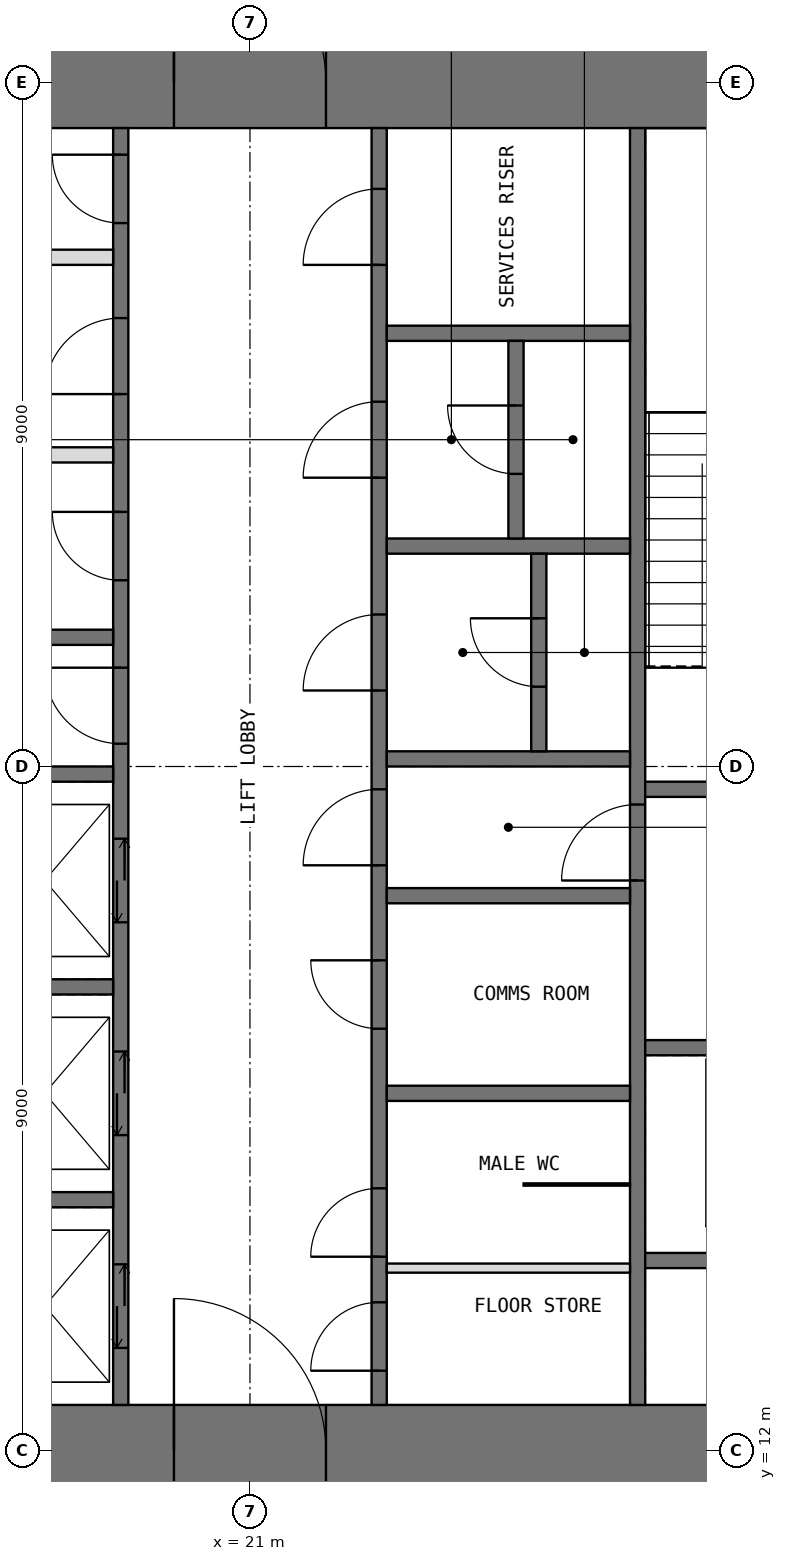
"""IFC4 building model, lengths in metres.
Left out: names, types, materials, properties, quantities, classifications, styles, units other than length and angle.
Written with IfcOpenShell. Run it as: python <this file> out.ifc"""

import sys

from ifc_helpers import new_model, si_unit, direction, frame, frame_2d, origin, place, context, subcontext, project, spatial, rectangle, extrude, element, fill, save


model = new_model("IFC4")
c1 = context("Model", 3, precision=1e-05, world=origin(), true_north=direction((0.0, 1.0)))
c2 = subcontext(c1, "Body", "Model", "MODEL_VIEW")
j1 = project(units=[si_unit("LENGTHUNIT", "METRE"), si_unit("PLANEANGLEUNIT", "RADIAN")], contexts=[c1])
p1 = place(None, origin())
s1 = spatial("IfcSite", under=j1, at=p1, CompositionType="ELEMENT")
p2 = place(p1, origin())
s2 = spatial("IfcBuilding", under=s1, at=p2, CompositionType="ELEMENT")
p3 = place(p2, frame((0.0, 0.0, 260.8)))
s3 = spatial("IfcBuildingStorey", under=s2, at=p3, CompositionType="ELEMENT", Elevation=260.8)
p4 = place(p3, frame((11.4, 12.0, -0.05), z_axis=(0.0, 0.0, 1.0), x_axis=(1.0, 0.0, 0.0)))
e1 = element("IfcWall", 1, at=p4, inside=s3, PredefinedType="SHEAR", context=c2, shape_type="SweptSolid", body=[
    extrude(rectangle(XDim=19.2, YDim=1.2, at=frame_2d((9.6, 0.0))), origin(), (0.0, 0.0, 1.0), 4.2),
])
p5 = place(p4, frame((8.6, 0.0, 0.05)))
e2 = element("IfcOpeningElement", 2, at=p5, cuts=e1, PredefinedType="OPENING", context=c2, shape_type="SweptSolid", body=[
    extrude(rectangle(XDim=2.0, YDim=2.2, at=frame_2d((1.0, 1.1))), frame((0.0, 0.61, 0.0), z_axis=(0.0, -1.0, 0.0), x_axis=(1.0, 0.0, 0.0)), (0.0, 0.0, 1.0), 1.22),
])
p6 = place(p3, frame((11.4, 30.0, -0.05), z_axis=(0.0, 0.0, 1.0), x_axis=(1.0, 0.0, 0.0)))
e3 = element("IfcWall", 3, at=p6, inside=s3, PredefinedType="SHEAR", context=c2, shape_type="SweptSolid", body=[
    extrude(rectangle(XDim=19.2, YDim=1.2, at=frame_2d((9.6, 0.0))), origin(), (0.0, 0.0, 1.0), 4.2),
])
p7 = place(p6, frame((8.6, 0.0, 0.05)))
e4 = element("IfcOpeningElement", 4, at=p7, cuts=e3, PredefinedType="OPENING", context=c2, shape_type="SweptSolid", body=[
    extrude(rectangle(XDim=2.0, YDim=2.2, at=frame_2d((1.0, 1.1))), frame((0.0, 0.61, 0.0), z_axis=(0.0, -1.0, 0.0), x_axis=(1.0, 0.0, 0.0)), (0.0, 0.0, 1.0), 1.22),
])
p8 = place(p3, frame((19.3, 12.6, -0.05), z_axis=(0.0, 0.0, 1.0), x_axis=(0.0, 1.0, 0.0)))
e5 = element("IfcWall", 5, at=p8, inside=s3, PredefinedType="SHEAR", context=c2, shape_type="SweptSolid", body=[
    extrude(rectangle(XDim=16.8, YDim=0.2, at=frame_2d((8.4, 0.0))), origin(), (0.0, 0.0, 1.0), 4.2),
])
p9 = place(p8, frame((8.7, 0.0, 0.05)))
e6 = element("IfcOpeningElement", 6, at=p9, cuts=e5, PredefinedType="OPENING", context=c2, shape_type="SweptSolid", body=[
    extrude(rectangle(XDim=1.0, YDim=2.2, at=frame_2d((0.5, 1.1))), frame((0.0, 0.11, 0.0), z_axis=(0.0, -1.0, 0.0), x_axis=(1.0, 0.0, 0.0)), (0.0, 0.0, 1.0), 0.22),
])
p10 = place(p8, frame((10.85, 0.0, 0.05)))
e7 = element("IfcOpeningElement", 7, at=p10, cuts=e5, PredefinedType="OPENING", context=c2, shape_type="SweptSolid", body=[
    extrude(rectangle(XDim=0.9, YDim=2.2, at=frame_2d((0.45, 1.1))), frame((0.0, 0.11, 0.0), z_axis=(0.0, -1.0, 0.0), x_axis=(1.0, 0.0, 0.0)), (0.0, 0.0, 1.0), 0.22),
])
p11 = place(p8, frame((13.3, 0.0, 0.05)))
e8 = element("IfcOpeningElement", 8, at=p11, cuts=e5, PredefinedType="OPENING", context=c2, shape_type="SweptSolid", body=[
    extrude(rectangle(XDim=1.0, YDim=2.2, at=frame_2d((0.5, 1.1))), frame((0.0, 0.11, 0.0), z_axis=(0.0, -1.0, 0.0), x_axis=(1.0, 0.0, 0.0)), (0.0, 0.0, 1.0), 0.22),
])
p12 = place(p8, frame((15.55, 0.0, 0.05)))
e9 = element("IfcOpeningElement", 9, at=p12, cuts=e5, PredefinedType="OPENING", context=c2, shape_type="SweptSolid", body=[
    extrude(rectangle(XDim=0.9, YDim=2.2, at=frame_2d((0.45, 1.1))), frame((0.0, 0.11, 0.0), z_axis=(0.0, -1.0, 0.0), x_axis=(1.0, 0.0, 0.0)), (0.0, 0.0, 1.0), 0.22),
])
p13 = place(p8, frame((0.75, 0.0, 0.05)))
e10 = element("IfcOpeningElement", 10, at=p13, cuts=e5, PredefinedType="OPENING", context=c2, shape_type="SweptSolid", body=[
    extrude(rectangle(XDim=1.1, YDim=2.2, at=frame_2d((0.55, 1.1))), frame((0.0, 0.11, 0.0), z_axis=(0.0, -1.0, 0.0), x_axis=(1.0, 0.0, 0.0)), (0.0, 0.0, 1.0), 0.22),
])
p14 = place(p8, frame((3.55, 0.0, 0.05)))
e11 = element("IfcOpeningElement", 11, at=p14, cuts=e5, PredefinedType="OPENING", context=c2, shape_type="SweptSolid", body=[
    extrude(rectangle(XDim=1.1, YDim=2.2, at=frame_2d((0.55, 1.1))), frame((0.0, 0.11, 0.0), z_axis=(0.0, -1.0, 0.0), x_axis=(1.0, 0.0, 0.0)), (0.0, 0.0, 1.0), 0.22),
])
p15 = place(p8, frame((6.35, 0.0, 0.05)))
e12 = element("IfcOpeningElement", 12, at=p15, cuts=e5, PredefinedType="OPENING", context=c2, shape_type="SweptSolid", body=[
    extrude(rectangle(XDim=1.1, YDim=2.2, at=frame_2d((0.55, 1.1))), frame((0.0, 0.11, 0.0), z_axis=(0.0, -1.0, 0.0), x_axis=(1.0, 0.0, 0.0)), (0.0, 0.0, 1.0), 0.22),
])
p16 = place(p3, frame((22.7, 12.6, -0.05), z_axis=(0.0, 0.0, 1.0), x_axis=(0.0, 1.0, 0.0)))
e13 = element("IfcWall", 13, at=p16, inside=s3, PredefinedType="SHEAR", context=c2, shape_type="SweptSolid", body=[
    extrude(rectangle(XDim=16.8, YDim=0.2, at=frame_2d((8.4, 0.0))), origin(), (0.0, 0.0, 1.0), 4.2),
])
p17 = place(p16, frame((0.45, 0.0, 0.05)))
e14 = element("IfcOpeningElement", 14, at=p17, cuts=e13, PredefinedType="OPENING", context=c2, shape_type="SweptSolid", body=[
    extrude(rectangle(XDim=0.9, YDim=2.2, at=frame_2d((0.45, 1.1))), frame((0.0, 0.11, 0.0), z_axis=(0.0, -1.0, 0.0), x_axis=(1.0, 0.0, 0.0)), (0.0, 0.0, 1.0), 0.22),
])
p18 = place(p16, frame((7.1, 0.0, 0.05)))
e15 = element("IfcOpeningElement", 15, at=p18, cuts=e13, PredefinedType="OPENING", context=c2, shape_type="SweptSolid", body=[
    extrude(rectangle(XDim=1.0, YDim=2.2, at=frame_2d((0.5, 1.1))), frame((0.0, 0.11, 0.0), z_axis=(0.0, -1.0, 0.0), x_axis=(1.0, 0.0, 0.0)), (0.0, 0.0, 1.0), 0.22),
])
p19 = place(p16, frame((1.95, 0.0, 0.05)))
e16 = element("IfcOpeningElement", 16, at=p19, cuts=e13, PredefinedType="OPENING", context=c2, shape_type="SweptSolid", body=[
    extrude(rectangle(XDim=0.9, YDim=2.2, at=frame_2d((0.45, 1.1))), frame((0.0, 0.11, 0.0), z_axis=(0.0, -1.0, 0.0), x_axis=(1.0, 0.0, 0.0)), (0.0, 0.0, 1.0), 0.22),
])
p20 = place(p16, frame((4.95, 0.0, 0.05)))
e17 = element("IfcOpeningElement", 17, at=p20, cuts=e13, PredefinedType="OPENING", context=c2, shape_type="SweptSolid", body=[
    extrude(rectangle(XDim=0.9, YDim=2.2, at=frame_2d((0.45, 1.1))), frame((0.0, 0.11, 0.0), z_axis=(0.0, -1.0, 0.0), x_axis=(1.0, 0.0, 0.0)), (0.0, 0.0, 1.0), 0.22),
])
p21 = place(p16, frame((9.4, 0.0, 0.05)))
e18 = element("IfcOpeningElement", 18, at=p21, cuts=e13, PredefinedType="OPENING", context=c2, shape_type="SweptSolid", body=[
    extrude(rectangle(XDim=1.0, YDim=2.2, at=frame_2d((0.5, 1.1))), frame((0.0, 0.11, 0.0), z_axis=(0.0, -1.0, 0.0), x_axis=(1.0, 0.0, 0.0)), (0.0, 0.0, 1.0), 0.22),
])
p22 = place(p16, frame((12.2, 0.0, 0.05)))
e19 = element("IfcOpeningElement", 19, at=p22, cuts=e13, PredefinedType="OPENING", context=c2, shape_type="SweptSolid", body=[
    extrude(rectangle(XDim=1.0, YDim=2.2, at=frame_2d((0.5, 1.1))), frame((0.0, 0.11, 0.0), z_axis=(0.0, -1.0, 0.0), x_axis=(1.0, 0.0, 0.0)), (0.0, 0.0, 1.0), 0.22),
])
p23 = place(p16, frame((15.0, 0.0, 0.05)))
e20 = element("IfcOpeningElement", 20, at=p23, cuts=e13, PredefinedType="OPENING", context=c2, shape_type="SweptSolid", body=[
    extrude(rectangle(XDim=1.0, YDim=2.2, at=frame_2d((0.5, 1.1))), frame((0.0, 0.11, 0.0), z_axis=(0.0, -1.0, 0.0), x_axis=(1.0, 0.0, 0.0)), (0.0, 0.0, 1.0), 0.22),
])
p24 = place(p3, frame((26.1, 12.6, -0.05), z_axis=(0.0, 0.0, 1.0), x_axis=(0.0, 1.0, 0.0)))
e21 = element("IfcWall", 21, at=p24, inside=s3, PredefinedType="SHEAR", context=c2, shape_type="SweptSolid", body=[
    extrude(rectangle(XDim=16.8, YDim=0.2, at=frame_2d((8.4, 0.0))), origin(), (0.0, 0.0, 1.0), 4.2),
])
p25 = place(p24, frame((6.9, 0.0, 0.05)))
e22 = element("IfcOpeningElement", 22, at=p25, cuts=e21, PredefinedType="OPENING", context=c2, shape_type="SweptSolid", body=[
    extrude(rectangle(XDim=1.0, YDim=2.2, at=frame_2d((0.5, 1.1))), frame((0.0, 0.11, 0.0), z_axis=(0.0, -1.0, 0.0), x_axis=(1.0, 0.0, 0.0)), (0.0, 0.0, 1.0), 0.22),
])
for number, where, z_axis, x_axis in (
    (23, (16.0, 15.3, -0.05), (0.0, 0.0, 1.0), (1.0, 0.0, 0.0)),
    (24, (16.0, 18.1, -0.05), (0.0, 0.0, 1.0), (1.0, 0.0, 0.0)),
    (25, (16.0, 20.9, -0.05), (0.0, 0.0, 1.0), (1.0, 0.0, 0.0)),
    (26, (16.0, 22.7, -0.05), (0.0, 0.0, 1.0), (1.0, 0.0, 0.0)),
):
    element("IfcWall", number, at=place(p3, frame(where, z_axis=z_axis, x_axis=x_axis)), inside=s3, PredefinedType="SHEAR", context=c2, shape_type="SweptSolid", body=[
        extrude(rectangle(XDim=3.2, YDim=0.2, at=frame_2d((1.6, 0.0))), origin(), (0.0, 0.0, 1.0), 4.2),
    ])
for number, where, z_axis, x_axis in (
    (27, (16.0, 25.1, 0.0), (0.0, 0.0, 1.0), (1.0, 0.0, 0.0)),
    (28, (16.0, 27.7, 0.0), (0.0, 0.0, 1.0), (1.0, 0.0, 0.0)),
):
    element("IfcWall", number, at=place(p3, frame(where, z_axis=z_axis, x_axis=x_axis)), inside=s3, PredefinedType="PARTITIONING", context=c2, shape_type="SweptSolid", body=[
        extrude(rectangle(XDim=3.2, YDim=0.2, at=frame_2d((1.6, 0.0))), origin(), (0.0, 0.0, 1.0), 3.95),
    ])
for number, where, z_axis, x_axis in (
    (29, (22.8, 16.7, -0.05), (0.0, 0.0, 1.0), (1.0, 0.0, 0.0)),
    (30, (22.8, 19.3, -0.05), (0.0, 0.0, 1.0), (1.0, 0.0, 0.0)),
    (31, (22.8, 21.1, -0.05), (0.0, 0.0, 1.0), (1.0, 0.0, 0.0)),
    (32, (22.8, 23.9, -0.05), (0.0, 0.0, 1.0), (1.0, 0.0, 0.0)),
    (33, (22.8, 26.7, -0.05), (0.0, 0.0, 1.0), (1.0, 0.0, 0.0)),
    (34, (26.2, 14.5, -0.05), (0.0, 0.0, 1.0), (1.0, 0.0, 0.0)),
):
    element("IfcWall", number, at=place(p3, frame(where, z_axis=z_axis, x_axis=x_axis)), inside=s3, PredefinedType="SHEAR", context=c2, shape_type="SweptSolid", body=[
        extrude(rectangle(XDim=3.2, YDim=0.2, at=frame_2d((1.6, 0.0))), origin(), (0.0, 0.0, 1.0), 4.2),
    ])
p26 = place(p3, frame((26.2, 17.3, -0.05), z_axis=(0.0, 0.0, 1.0), x_axis=(1.0, 0.0, 0.0)))
e35 = element("IfcWall", 35, at=p26, inside=s3, PredefinedType="SHEAR", context=c2, shape_type="SweptSolid", body=[
    extrude(rectangle(XDim=3.2, YDim=0.2, at=frame_2d((1.6, 0.0))), origin(), (0.0, 0.0, 1.0), 4.2),
])
p27 = place(p26, frame((1.0, 0.0, 0.05)))
e36 = element("IfcOpeningElement", 36, at=p27, cuts=e35, PredefinedType="OPENING", context=c2, shape_type="SweptSolid", body=[
    extrude(rectangle(XDim=1.2, YDim=2.2, at=frame_2d((0.6, 1.1))), frame((0.0, 0.11, 0.0), z_axis=(0.0, -1.0, 0.0), x_axis=(1.0, 0.0, 0.0)), (0.0, 0.0, 1.0), 0.22),
])
p28 = place(p3, frame((26.2, 20.7, -0.05), z_axis=(0.0, 0.0, 1.0), x_axis=(1.0, 0.0, 0.0)))
e37 = element("IfcWall", 37, at=p28, inside=s3, PredefinedType="SHEAR", context=c2, shape_type="SweptSolid", body=[
    extrude(rectangle(XDim=3.2, YDim=0.2, at=frame_2d((1.6, 0.0))), origin(), (0.0, 0.0, 1.0), 4.2),
])
p29 = place(p28, frame((1.1, 0.0, 0.05)))
e38 = element("IfcOpeningElement", 38, at=p29, cuts=e37, PredefinedType="OPENING", context=c2, shape_type="SweptSolid", body=[
    extrude(rectangle(XDim=1.0, YDim=2.2, at=frame_2d((0.5, 1.1))), frame((0.0, 0.11, 0.0), z_axis=(0.0, -1.0, 0.0), x_axis=(1.0, 0.0, 0.0)), (0.0, 0.0, 1.0), 0.22),
])
p30 = place(p3, frame((22.8, 14.4, 0.0), z_axis=(0.0, 0.0, 1.0), x_axis=(1.0, 0.0, 0.0)))
e39 = element("IfcWall", 39, at=p30, inside=s3, PredefinedType="PARTITIONING", context=c2, shape_type="SweptSolid", body=[
    extrude(rectangle(XDim=3.2, YDim=0.12, at=frame_2d((1.6, 0.0))), origin(), (0.0, 0.0, 1.0), 3.95),
])
p31 = place(p3, frame((24.6, 15.5, 0.0), z_axis=(0.0, 0.0, 1.0), x_axis=(1.0, 0.0, 0.0)))
e40 = element("IfcWall", 40, at=p31, inside=s3, PredefinedType="PARTITIONING", context=c2, shape_type="SweptSolid", body=[
    extrude(rectangle(XDim=1.4, YDim=0.03, at=frame_2d((0.7, 0.0))), origin(), (0.0, 0.0, 1.0), 3.95),
])
p32 = place(p3, frame((24.8, 21.2, -0.05), z_axis=(0.0, 0.0, 1.0), x_axis=(0.0, 1.0, 0.0)))
e41 = element("IfcWall", 41, at=p32, inside=s3, PredefinedType="SHEAR", context=c2, shape_type="SweptSolid", body=[
    extrude(rectangle(XDim=2.6, YDim=0.2, at=frame_2d((1.3, 0.0))), origin(), (0.0, 0.0, 1.0), 4.2),
])
p33 = place(p32, frame((0.85, 0.0, 0.05)))
e42 = element("IfcOpeningElement", 42, at=p33, cuts=e41, PredefinedType="OPENING", context=c2, shape_type="SweptSolid", body=[
    extrude(rectangle(XDim=0.9, YDim=2.2, at=frame_2d((0.45, 1.1))), frame((0.0, 0.11, 0.0), z_axis=(0.0, -1.0, 0.0), x_axis=(1.0, 0.0, 0.0)), (0.0, 0.0, 1.0), 0.22),
])
p34 = place(p3, frame((24.5, 24.0, -0.05), z_axis=(0.0, 0.0, 1.0), x_axis=(0.0, 1.0, 0.0)))
e43 = element("IfcWall", 43, at=p34, inside=s3, PredefinedType="SHEAR", context=c2, shape_type="SweptSolid", body=[
    extrude(rectangle(XDim=2.6, YDim=0.2, at=frame_2d((1.3, 0.0))), origin(), (0.0, 0.0, 1.0), 4.2),
])
p35 = place(p34, frame((0.85, 0.0, 0.05)))
e44 = element("IfcOpeningElement", 44, at=p35, cuts=e43, PredefinedType="OPENING", context=c2, shape_type="SweptSolid", body=[
    extrude(rectangle(XDim=0.9, YDim=2.2, at=frame_2d((0.45, 1.1))), frame((0.0, 0.11, 0.0), z_axis=(0.0, -1.0, 0.0), x_axis=(1.0, 0.0, 0.0)), (0.0, 0.0, 1.0), 0.22),
])
p36 = place(p5, origin())
e45 = element("IfcDoor", 45, at=p36, inside=s3, OperationType="DOUBLE_DOOR_SINGLE_SWING", PredefinedType="DOOR", context=c2, shape_type="SweptSolid", body=[
    extrude(rectangle(XDim=2.0, YDim=2.2, at=frame_2d((1.0, 1.1))), frame((0.0, 0.025, 0.0), z_axis=(0.0, -1.0, 0.0), x_axis=(1.0, 0.0, 0.0)), (0.0, 0.0, 1.0), 0.05),
])
fill(e2, e45)
p37 = place(p7, origin())
e46 = element("IfcDoor", 46, at=p37, inside=s3, OperationType="DOUBLE_DOOR_SINGLE_SWING", PredefinedType="DOOR", context=c2, shape_type="SweptSolid", body=[
    extrude(rectangle(XDim=2.0, YDim=2.2, at=frame_2d((1.0, 1.1))), frame((0.0, 0.025, 0.0), z_axis=(0.0, -1.0, 0.0), x_axis=(1.0, 0.0, 0.0)), (0.0, 0.0, 1.0), 0.05),
])
fill(e4, e46)
p38 = place(p17, origin())
e47 = element("IfcDoor", 47, at=p38, inside=s3, OperationType="SINGLE_SWING_LEFT", PredefinedType="DOOR", context=c2, shape_type="SweptSolid", body=[
    extrude(rectangle(XDim=0.9, YDim=2.2, at=frame_2d((0.45, 1.1))), frame((0.0, 0.025, 0.0), z_axis=(0.0, -1.0, 0.0), x_axis=(1.0, 0.0, 0.0)), (0.0, 0.0, 1.0), 0.05),
])
fill(e14, e47)
p39 = place(p25, origin())
e48 = element("IfcDoor", 48, at=p39, inside=s3, OperationType="SINGLE_SWING_LEFT", PredefinedType="DOOR", context=c2, shape_type="SweptSolid", body=[
    extrude(rectangle(XDim=1.0, YDim=2.2, at=frame_2d((0.5, 1.1))), frame((0.0, 0.025, 0.0), z_axis=(0.0, -1.0, 0.0), x_axis=(1.0, 0.0, 0.0)), (0.0, 0.0, 1.0), 0.05),
])
fill(e22, e48)
p40 = place(p9, origin())
e49 = element("IfcDoor", 49, at=p40, inside=s3, OperationType="SINGLE_SWING_RIGHT", PredefinedType="DOOR", context=c2, shape_type="SweptSolid", body=[
    extrude(rectangle(XDim=1.0, YDim=2.2, at=frame_2d((0.5, 1.1))), frame((0.0, 0.025, 0.0), z_axis=(0.0, -1.0, 0.0), x_axis=(1.0, 0.0, 0.0)), (0.0, 0.0, 1.0), 0.05),
])
fill(e6, e49)
p41 = place(p18, origin())
e50 = element("IfcDoor", 50, at=p41, inside=s3, OperationType="SINGLE_SWING_LEFT", PredefinedType="DOOR", context=c2, shape_type="SweptSolid", body=[
    extrude(rectangle(XDim=1.0, YDim=2.2, at=frame_2d((0.5, 1.1))), frame((0.0, 0.025, 0.0), z_axis=(0.0, -1.0, 0.0), x_axis=(1.0, 0.0, 0.0)), (0.0, 0.0, 1.0), 0.05),
])
fill(e15, e50)
p42 = place(p10, origin())
e51 = element("IfcDoor", 51, at=p42, inside=s3, OperationType="SINGLE_SWING_RIGHT", PredefinedType="DOOR", context=c2, shape_type="SweptSolid", body=[
    extrude(rectangle(XDim=0.9, YDim=2.2, at=frame_2d((0.45, 1.1))), frame((0.0, 0.025, 0.0), z_axis=(0.0, -1.0, 0.0), x_axis=(1.0, 0.0, 0.0)), (0.0, 0.0, 1.0), 0.05),
])
fill(e7, e51)
p43 = place(p11, origin())
e52 = element("IfcDoor", 52, at=p43, inside=s3, OperationType="SINGLE_SWING_LEFT", PredefinedType="DOOR", context=c2, shape_type="SweptSolid", body=[
    extrude(rectangle(XDim=1.0, YDim=2.2, at=frame_2d((0.5, 1.1))), frame((0.0, 0.025, 0.0), z_axis=(0.0, -1.0, 0.0), x_axis=(1.0, 0.0, 0.0)), (0.0, 0.0, 1.0), 0.05),
])
fill(e8, e52)
p44 = place(p12, origin())
e53 = element("IfcDoor", 53, at=p44, inside=s3, OperationType="SINGLE_SWING_RIGHT", PredefinedType="DOOR", context=c2, shape_type="SweptSolid", body=[
    extrude(rectangle(XDim=0.9, YDim=2.2, at=frame_2d((0.45, 1.1))), frame((0.0, 0.025, 0.0), z_axis=(0.0, -1.0, 0.0), x_axis=(1.0, 0.0, 0.0)), (0.0, 0.0, 1.0), 0.05),
])
fill(e9, e53)
p45 = place(p19, origin())
e54 = element("IfcDoor", 54, at=p45, inside=s3, OperationType="SINGLE_SWING_LEFT", PredefinedType="DOOR", context=c2, shape_type="SweptSolid", body=[
    extrude(rectangle(XDim=0.9, YDim=2.2, at=frame_2d((0.45, 1.1))), frame((0.0, 0.025, 0.0), z_axis=(0.0, -1.0, 0.0), x_axis=(1.0, 0.0, 0.0)), (0.0, 0.0, 1.0), 0.05),
])
fill(e16, e54)
p46 = place(p20, origin())
e55 = element("IfcDoor", 55, at=p46, inside=s3, OperationType="SINGLE_SWING_RIGHT", PredefinedType="DOOR", context=c2, shape_type="SweptSolid", body=[
    extrude(rectangle(XDim=0.9, YDim=2.2, at=frame_2d((0.45, 1.1))), frame((0.0, 0.025, 0.0), z_axis=(0.0, -1.0, 0.0), x_axis=(1.0, 0.0, 0.0)), (0.0, 0.0, 1.0), 0.05),
])
fill(e17, e55)
p47 = place(p21, origin())
e56 = element("IfcDoor", 56, at=p47, inside=s3, OperationType="SINGLE_SWING_LEFT", PredefinedType="DOOR", context=c2, shape_type="SweptSolid", body=[
    extrude(rectangle(XDim=1.0, YDim=2.2, at=frame_2d((0.5, 1.1))), frame((0.0, 0.025, 0.0), z_axis=(0.0, -1.0, 0.0), x_axis=(1.0, 0.0, 0.0)), (0.0, 0.0, 1.0), 0.05),
])
fill(e18, e56)
p48 = place(p33, origin())
e57 = element("IfcDoor", 57, at=p48, inside=s3, OperationType="SINGLE_SWING_RIGHT", PredefinedType="DOOR", context=c2, shape_type="SweptSolid", body=[
    extrude(rectangle(XDim=0.9, YDim=2.2, at=frame_2d((0.45, 1.1))), frame((0.0, 0.025, 0.0), z_axis=(0.0, -1.0, 0.0), x_axis=(1.0, 0.0, 0.0)), (0.0, 0.0, 1.0), 0.05),
])
fill(e42, e57)
p49 = place(p22, origin())
e58 = element("IfcDoor", 58, at=p49, inside=s3, OperationType="SINGLE_SWING_LEFT", PredefinedType="DOOR", context=c2, shape_type="SweptSolid", body=[
    extrude(rectangle(XDim=1.0, YDim=2.2, at=frame_2d((0.5, 1.1))), frame((0.0, 0.025, 0.0), z_axis=(0.0, -1.0, 0.0), x_axis=(1.0, 0.0, 0.0)), (0.0, 0.0, 1.0), 0.05),
])
fill(e19, e58)
p50 = place(p35, origin())
e59 = element("IfcDoor", 59, at=p50, inside=s3, OperationType="SINGLE_SWING_RIGHT", PredefinedType="DOOR", context=c2, shape_type="SweptSolid", body=[
    extrude(rectangle(XDim=0.9, YDim=2.2, at=frame_2d((0.45, 1.1))), frame((0.0, 0.025, 0.0), z_axis=(0.0, -1.0, 0.0), x_axis=(1.0, 0.0, 0.0)), (0.0, 0.0, 1.0), 0.05),
])
fill(e44, e59)
p51 = place(p23, origin())
e60 = element("IfcDoor", 60, at=p51, inside=s3, OperationType="SINGLE_SWING_LEFT", PredefinedType="DOOR", context=c2, shape_type="SweptSolid", body=[
    extrude(rectangle(XDim=1.0, YDim=2.2, at=frame_2d((0.5, 1.1))), frame((0.0, 0.025, 0.0), z_axis=(0.0, -1.0, 0.0), x_axis=(1.0, 0.0, 0.0)), (0.0, 0.0, 1.0), 0.05),
])
fill(e20, e60)
p52 = place(p13, origin())
e61 = element("IfcDoor", 61, at=p52, inside=s3, OperationType="DOUBLE_DOOR_SLIDING", PredefinedType="DOOR", context=c2, shape_type="SweptSolid", body=[
    extrude(rectangle(XDim=1.1, YDim=2.2, at=frame_2d((0.55, 1.1))), frame((0.0, 0.025, 0.0), z_axis=(0.0, -1.0, 0.0), x_axis=(1.0, 0.0, 0.0)), (0.0, 0.0, 1.0), 0.05),
])
fill(e10, e61)
p53 = place(p14, origin())
e62 = element("IfcDoor", 62, at=p53, inside=s3, OperationType="DOUBLE_DOOR_SLIDING", PredefinedType="DOOR", context=c2, shape_type="SweptSolid", body=[
    extrude(rectangle(XDim=1.1, YDim=2.2, at=frame_2d((0.55, 1.1))), frame((0.0, 0.025, 0.0), z_axis=(0.0, -1.0, 0.0), x_axis=(1.0, 0.0, 0.0)), (0.0, 0.0, 1.0), 0.05),
])
fill(e11, e62)
p54 = place(p15, origin())
e63 = element("IfcDoor", 63, at=p54, inside=s3, OperationType="DOUBLE_DOOR_SLIDING", PredefinedType="DOOR", context=c2, shape_type="SweptSolid", body=[
    extrude(rectangle(XDim=1.1, YDim=2.2, at=frame_2d((0.55, 1.1))), frame((0.0, 0.025, 0.0), z_axis=(0.0, -1.0, 0.0), x_axis=(1.0, 0.0, 0.0)), (0.0, 0.0, 1.0), 0.05),
])
fill(e12, e63)
save(model, sys.argv[1])
